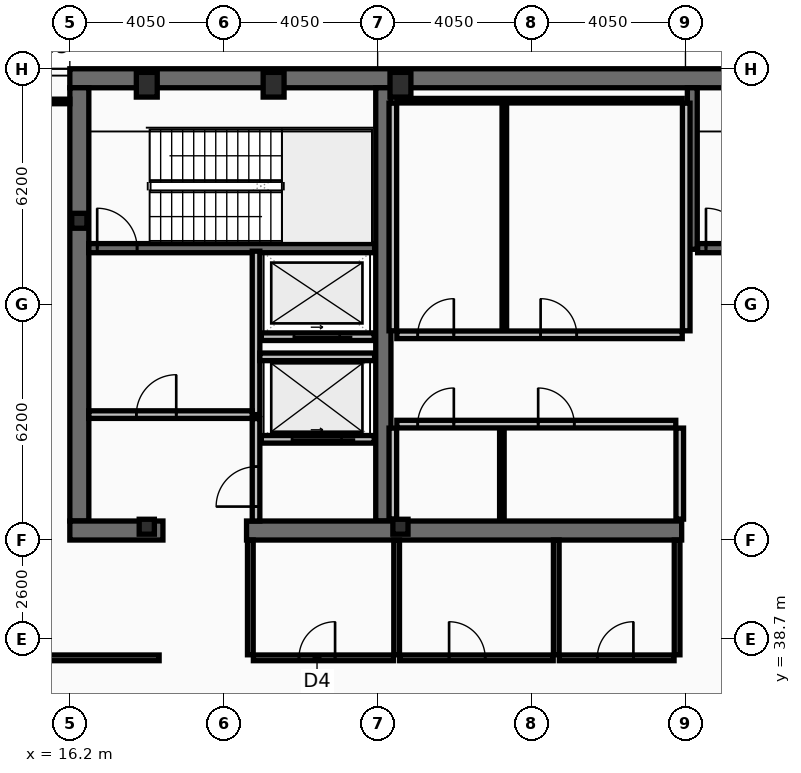
"""IFC4 building model, lengths in metres.
Left out: names, types, materials, properties, quantities, classifications, styles, units other than length and angle.
Written with IfcOpenShell. Run it as: python <this file> out.ifc"""

import sys

from ifc_helpers import new_model, si_unit, direction, frame, frame_2d, origin, origin_2d, place, context, subcontext, project, spatial, rectangle, hollow_rectangle, i_section, extrude, element, fill, save


model = new_model("IFC4")
c1 = context("Model", 3, precision=1e-05, world=origin(), true_north=direction((0.0, 1.0)))
c2 = subcontext(c1, "Body", "Model", "MODEL_VIEW")
j1 = project(units=[si_unit("LENGTHUNIT", "METRE"), si_unit("PLANEANGLEUNIT", "RADIAN")], contexts=[c1])
p1 = place(None, origin())
s1 = spatial("IfcSite", under=j1, at=p1, CompositionType="ELEMENT")
p2 = place(p1, origin())
s2 = spatial("IfcBuilding", under=s1, at=p2, CompositionType="ELEMENT")
p3 = place(p2, frame((0.0, 0.0, 310.2)))
s3 = spatial("IfcBuildingStorey", under=s2, at=p3, CompositionType="ELEMENT", Elevation=310.2)
p4 = place(p3, frame((16.2, 53.45, 0.0), z_axis=(0.0, 0.0, 1.0), x_axis=(1.0, 0.0, 0.0)))
e1 = element("IfcWall", 1, at=p4, inside=s3, PredefinedType="SHEAR", context=c2, shape_type="SweptSolid", body=[
    extrude(rectangle(XDim=40.5, YDim=0.5, at=frame_2d((20.25, 0.0))), origin(), (0.0, 0.0, 1.0), 4.24),
])
p5 = place(p3, frame((16.45, 41.8, 0.0), z_axis=(0.0, 0.0, 1.0), x_axis=(0.0, 1.0, 0.0)))
e2 = element("IfcWall", 2, at=p5, inside=s3, PredefinedType="SHEAR", context=c2, shape_type="SweptSolid", body=[
    extrude(rectangle(XDim=11.4, YDim=0.5, at=frame_2d((5.7, 0.0))), origin(), (0.0, 0.0, 1.0), 4.24),
])
p6 = place(p3, frame((24.45, 41.8, 0.0), z_axis=(0.0, 0.0, 1.0), x_axis=(0.0, 1.0, 0.0)))
e3 = element("IfcWall", 3, at=p6, inside=s3, PredefinedType="SHEAR", context=c2, shape_type="SweptSolid", body=[
    extrude(rectangle(XDim=11.4, YDim=0.4, at=frame_2d((5.7, 0.0))), origin(), (0.0, 0.0, 1.0), 4.24),
])
p7 = place(p3, frame((18.65, 41.55, 0.0), z_axis=(0.0, 0.0, 1.0), x_axis=(-1.0, 0.0, 0.0)))
e4 = element("IfcWall", 4, at=p7, inside=s3, PredefinedType="SHEAR", context=c2, shape_type="SweptSolid", body=[
    extrude(rectangle(XDim=2.45, YDim=0.5, at=frame_2d((1.225, 0.0))), origin(), (0.0, 0.0, 1.0), 4.24),
])
p8 = place(p3, frame((32.3, 41.55, 0.0), z_axis=(0.0, 0.0, 1.0), x_axis=(-1.0, 0.0, 0.0)))
e5 = element("IfcWall", 5, at=p8, inside=s3, PredefinedType="SHEAR", context=c2, shape_type="SweptSolid", body=[
    extrude(rectangle(XDim=11.45, YDim=0.5, at=frame_2d((5.725, 0.0))), origin(), (0.0, 0.0, 1.0), 4.24),
])
p9 = place(p3, frame((32.58, 48.95, 0.0), z_axis=(0.0, 0.0, 1.0), x_axis=(0.0, 1.0, 0.0)))
e6 = element("IfcWall", 6, at=p9, inside=s3, PredefinedType="SHEAR", context=c2, shape_type="SweptSolid", body=[
    extrude(rectangle(XDim=4.25, YDim=0.26, at=frame_2d((2.125, 0.0))), origin(), (0.0, 0.0, 1.0), 4.24),
])
p10 = place(p3, frame((16.7, 48.98, 0.0), z_axis=(0.0, 0.0, 1.0), x_axis=(1.0, 0.0, 0.0)))
e7 = element("IfcWall", 7, at=p10, inside=s3, PredefinedType="SHEAR", context=c2, shape_type="SweptSolid", body=[
    extrude(rectangle(XDim=7.52, YDim=0.24, at=frame_2d((3.76, 0.0))), origin(), (0.0, 0.0, 1.0), 4.24),
])
p11 = place(p10, frame((0.22, 0.0, 0.0)))
e8 = element("IfcOpeningElement", 8, at=p11, cuts=e7, PredefinedType="OPENING", context=c2, shape_type="SweptSolid", body=[
    extrude(rectangle(XDim=1.05, YDim=2.15, at=frame_2d((0.525, 1.075))), frame((0.0, 0.13, 0.0), z_axis=(0.0, -1.0, 0.0), x_axis=(1.0, 0.0, 0.0)), (0.0, 0.0, 1.0), 0.26),
])
p12 = place(p3, frame((32.72, 48.98, 0.0), z_axis=(0.0, 0.0, 1.0), x_axis=(1.0, 0.0, 0.0)))
e9 = element("IfcWall", 9, at=p12, inside=s3, PredefinedType="SHEAR", context=c2, shape_type="SweptSolid", body=[
    extrude(rectangle(XDim=7.56, YDim=0.24, at=frame_2d((3.78, 0.0))), origin(), (0.0, 0.0, 1.0), 4.24),
])
p13 = place(p12, frame((0.22, 0.0, 0.0)))
e10 = element("IfcOpeningElement", 10, at=p13, cuts=e9, PredefinedType="OPENING", context=c2, shape_type="SweptSolid", body=[
    extrude(rectangle(XDim=1.05, YDim=2.15, at=frame_2d((0.525, 1.075))), frame((0.0, 0.13, 0.0), z_axis=(0.0, -1.0, 0.0), x_axis=(1.0, 0.0, 0.0)), (0.0, 0.0, 1.0), 0.26),
])
for number, where, z_axis, x_axis in (
    (11, (18.225, 53.28, 0.0), (0.0, 0.0, 1.0), (1.0, 0.0, 0.0)),
    (12, (21.562, 53.28, 0.0), (0.0, 0.0, 1.0), (1.0, 0.0, 0.0)),
    (13, (24.9, 53.28, 0.0), (0.0, 0.0, 1.0), (1.0, 0.0, 0.0)),
):
    element("IfcColumn", number, at=place(p3, frame(where, z_axis=z_axis, x_axis=x_axis)), inside=s3, PredefinedType="COLUMN", context=c2, shape_type="SweptSolid", body=[
        extrude(hollow_rectangle(XDim=0.55, YDim=0.65, WallThickness=0.04, at=origin_2d()), origin(), (0.0, 0.0, 1.0), 4.4),
    ])
for number, where, z_axis, x_axis in (
    (14, (16.45, 49.7, 0.0), (0.0, 0.0, 1.0), (1.0, 0.0, 0.0)),
    (15, (18.225, 41.65, 0.0), (0.0, 0.0, 1.0), (1.0, 0.0, 0.0)),
    (16, (24.9, 41.65, 0.0), (0.0, 0.0, 1.0), (1.0, 0.0, 0.0)),
):
    element("IfcColumn", number, at=place(p3, frame(where, z_axis=z_axis, x_axis=x_axis)), inside=s3, PredefinedType="COLUMN", context=c2, shape_type="SweptSolid", body=[
        extrude(i_section(OverallWidth=0.399, OverallDepth=0.393, WebThickness=0.023, FlangeThickness=0.037, at=origin_2d()), origin(), (0.0, 0.0, 1.0), 4.4),
    ])
p14 = place(p3, frame((24.21, 43.95, 0.0), z_axis=(0.0, 0.0, 1.0), x_axis=(-1.0, 0.0, 0.0)))
e17 = element("IfcWall", 17, at=p14, inside=s3, PredefinedType="PARTITIONING", context=c2, shape_type="SweptSolid", body=[
    extrude(rectangle(XDim=2.97, YDim=0.2, at=frame_2d((1.485, 0.0))), origin(), (0.0, 0.0, 1.0), 4.24),
])
p15 = place(p14, frame((0.86, 0.0, 0.0)))
e18 = element("IfcOpeningElement", 18, at=p15, cuts=e17, PredefinedType="OPENING", context=c2, shape_type="SweptSolid", body=[
    extrude(rectangle(XDim=1.3, YDim=2.18, at=frame_2d((0.65, 1.09))), frame((0.0, 0.11, 0.0), z_axis=(0.0, -1.0, 0.0), x_axis=(1.0, 0.0, 0.0)), (0.0, 0.0, 1.0), 0.22),
])
p16 = place(p3, frame((24.21, 46.65, 0.0), z_axis=(0.0, 0.0, 1.0), x_axis=(-1.0, 0.0, 0.0)))
e19 = element("IfcWall", 19, at=p16, inside=s3, PredefinedType="PARTITIONING", context=c2, shape_type="SweptSolid", body=[
    extrude(rectangle(XDim=2.97, YDim=0.2, at=frame_2d((1.485, 0.0))), origin(), (0.0, 0.0, 1.0), 4.24),
])
p17 = place(p16, frame((0.91, 0.0, 0.0)))
e20 = element("IfcOpeningElement", 20, at=p17, cuts=e19, PredefinedType="OPENING", context=c2, shape_type="SweptSolid", body=[
    extrude(rectangle(XDim=1.2, YDim=2.18, at=frame_2d((0.6, 1.09))), frame((0.0, 0.11, 0.0), z_axis=(0.0, -1.0, 0.0), x_axis=(1.0, 0.0, 0.0)), (0.0, 0.0, 1.0), 0.22),
])
p18 = place(p3, frame((21.1, 44.6, 0.0), z_axis=(0.0, 0.0, 1.0), x_axis=(0.0, 1.0, 0.0)))
e21 = element("IfcWall", 21, at=p18, inside=s3, PredefinedType="PARTITIONING", context=c2, shape_type="SweptSolid", body=[
    extrude(rectangle(XDim=4.3, YDim=0.2, at=frame_2d((2.15, 0.0))), origin(), (0.0, 0.0, 1.0), 4.24),
])
p19 = place(p3, frame((16.7, 44.6, 0.0), z_axis=(0.0, 0.0, 1.0), x_axis=(1.0, 0.0, 0.0)))
e22 = element("IfcWall", 22, at=p19, inside=s3, PredefinedType="PARTITIONING", context=c2, shape_type="SweptSolid", body=[
    extrude(rectangle(XDim=4.3, YDim=0.2, at=frame_2d((2.15, 0.0))), origin(), (0.0, 0.0, 1.0), 4.24),
])
p20 = place(p19, frame((1.25, 0.0, 0.0)))
e23 = element("IfcOpeningElement", 23, at=p20, cuts=e22, PredefinedType="OPENING", context=c2, shape_type="SweptSolid", body=[
    extrude(rectangle(XDim=1.05, YDim=2.15, at=frame_2d((0.525, 1.075))), frame((0.0, 0.11, 0.0), z_axis=(0.0, -1.0, 0.0), x_axis=(1.0, 0.0, 0.0)), (0.0, 0.0, 1.0), 0.22),
])
p21 = place(p3, frame((21.2, 46.12, 0.0), z_axis=(0.0, 0.0, 1.0), x_axis=(1.0, 0.0, 0.0)))
e24 = element("IfcWall", 24, at=p21, inside=s3, PredefinedType="PARTITIONING", context=c2, shape_type="SweptSolid", body=[
    extrude(rectangle(XDim=3.02, YDim=0.2, at=frame_2d((1.51, 0.0))), origin(), (0.0, 0.0, 1.0), 4.24),
])
p22 = place(p3, frame((21.1, 41.8, 0.0), z_axis=(0.0, 0.0, 1.0), x_axis=(0.0, 1.0, 0.0)))
e25 = element("IfcWall", 25, at=p22, inside=s3, PredefinedType="PARTITIONING", context=c2, shape_type="SweptSolid", body=[
    extrude(rectangle(XDim=2.695, YDim=0.2, at=frame_2d((1.348, 0.0))), origin(), (0.0, 0.0, 1.0), 4.24),
])
p23 = place(p22, frame((0.38, 0.0, 0.0)))
e26 = element("IfcOpeningElement", 26, at=p23, cuts=e25, PredefinedType="OPENING", context=c2, shape_type="SweptSolid", body=[
    extrude(rectangle(XDim=1.05, YDim=2.15, at=frame_2d((0.525, 1.075))), frame((0.0, 0.11, 0.0), z_axis=(0.0, -1.0, 0.0), x_axis=(1.0, 0.0, 0.0)), (0.0, 0.0, 1.0), 0.22),
])
for number, where, z_axis, x_axis in (
    (27, (24.7, 46.805, 0.0), (0.0, 0.0, 1.0), (0.0, 1.0, 0.0)),
    (28, (32.42, 46.805, 0.0), (0.0, 0.0, 1.0), (0.0, 1.0, 0.0)),
):
    element("IfcWall", number, at=place(p3, frame(where, z_axis=z_axis, x_axis=x_axis)), inside=s3, PredefinedType="PARTITIONING", context=c2, shape_type="SweptSolid", body=[
        extrude(rectangle(XDim=5.99, YDim=0.2, at=frame_2d((2.995, 0.0))), origin(), (0.0, 0.0, 1.0), 4.24),
    ])
p24 = place(p3, frame((24.805, 52.86, 0.0), z_axis=(0.0, 0.0, 1.0), x_axis=(1.0, 0.0, 0.0)))
e29 = element("IfcWall", 29, at=p24, inside=s3, PredefinedType="PARTITIONING", context=c2, shape_type="SweptSolid", body=[
    extrude(rectangle(XDim=7.51, YDim=0.12, at=frame_2d((3.755, 0.0))), origin(), (0.0, 0.0, 1.0), 4.24),
])
p25 = place(p3, frame((27.634, 46.805, 0.0), z_axis=(0.0, 0.0, 1.0), x_axis=(0.0, 1.0, 0.0)))
e30 = element("IfcWall", 30, at=p25, inside=s3, PredefinedType="PARTITIONING", context=c2, shape_type="SweptSolid", body=[
    extrude(rectangle(XDim=5.99, YDim=0.12, at=frame_2d((2.995, 0.0))), origin(), (0.0, 0.0, 1.0), 4.24),
])
p26 = place(p3, frame((24.805, 46.7, 0.0), z_axis=(0.0, 0.0, 1.0), x_axis=(1.0, 0.0, 0.0)))
e31 = element("IfcWall", 31, at=p26, inside=s3, PredefinedType="PARTITIONING", context=c2, shape_type="SweptSolid", body=[
    extrude(rectangle(XDim=7.51, YDim=0.2, at=frame_2d((3.755, 0.0))), origin(), (0.0, 0.0, 1.0), 4.24),
])
p27 = place(p26, frame((0.55, 0.0, 0.0)))
e32 = element("IfcOpeningElement", 32, at=p27, cuts=e31, PredefinedType="OPENING", context=c2, shape_type="SweptSolid", body=[
    extrude(rectangle(XDim=0.95, YDim=2.1, at=frame_2d((0.475, 1.05))), frame((0.0, 0.11, 0.0), z_axis=(0.0, -1.0, 0.0), x_axis=(1.0, 0.0, 0.0)), (0.0, 0.0, 1.0), 0.22),
])
p28 = place(p26, frame((3.784, 0.0, 0.0)))
e33 = element("IfcOpeningElement", 33, at=p28, cuts=e31, PredefinedType="OPENING", context=c2, shape_type="SweptSolid", body=[
    extrude(rectangle(XDim=0.95, YDim=2.1, at=frame_2d((0.475, 1.05))), frame((0.0, 0.11, 0.0), z_axis=(0.0, -1.0, 0.0), x_axis=(1.0, 0.0, 0.0)), (0.0, 0.0, 1.0), 0.22),
])
for number, where, z_axis, x_axis in (
    (34, (24.7, 41.85, 0.0), (0.0, 0.0, 1.0), (0.0, 1.0, 0.0)),
    (35, (32.25, 41.85, 0.0), (0.0, 0.0, 1.0), (0.0, 1.0, 0.0)),
):
    element("IfcWall", number, at=place(p3, frame(where, z_axis=z_axis, x_axis=x_axis)), inside=s3, PredefinedType="PARTITIONING", context=c2, shape_type="SweptSolid", body=[
        extrude(rectangle(XDim=2.395, YDim=0.2, at=frame_2d((1.198, 0.0))), origin(), (0.0, 0.0, 1.0), 4.24),
    ])
p29 = place(p3, frame((27.569, 41.85, 0.0), z_axis=(0.0, 0.0, 1.0), x_axis=(0.0, 1.0, 0.0)))
e36 = element("IfcWall", 36, at=p29, inside=s3, PredefinedType="PARTITIONING", context=c2, shape_type="SweptSolid", body=[
    extrude(rectangle(XDim=2.395, YDim=0.12, at=frame_2d((1.198, 0.0))), origin(), (0.0, 0.0, 1.0), 4.24),
])
p30 = place(p3, frame((24.805, 44.35, 0.0), z_axis=(0.0, 0.0, 1.0), x_axis=(1.0, 0.0, 0.0)))
e37 = element("IfcWall", 37, at=p30, inside=s3, PredefinedType="PARTITIONING", context=c2, shape_type="SweptSolid", body=[
    extrude(rectangle(XDim=7.34, YDim=0.2, at=frame_2d((3.67, 0.0))), origin(), (0.0, 0.0, 1.0), 4.24),
])
p31 = place(p30, frame((0.55, 0.0, 0.0)))
e38 = element("IfcOpeningElement", 38, at=p31, cuts=e37, PredefinedType="OPENING", context=c2, shape_type="SweptSolid", body=[
    extrude(rectangle(XDim=0.95, YDim=2.1, at=frame_2d((0.475, 1.05))), frame((0.0, 0.11, 0.0), z_axis=(0.0, -1.0, 0.0), x_axis=(1.0, 0.0, 0.0)), (0.0, 0.0, 1.0), 0.22),
])
p32 = place(p30, frame((3.719, 0.0, 0.0)))
e39 = element("IfcOpeningElement", 39, at=p32, cuts=e37, PredefinedType="OPENING", context=c2, shape_type="SweptSolid", body=[
    extrude(rectangle(XDim=0.95, YDim=2.1, at=frame_2d((0.475, 1.05))), frame((0.0, 0.11, 0.0), z_axis=(0.0, -1.0, 0.0), x_axis=(1.0, 0.0, 0.0)), (0.0, 0.0, 1.0), 0.22),
])
p33 = place(p3, frame((21.03, 38.2, 0.0), z_axis=(0.0, 0.0, 1.0), x_axis=(1.0, 0.0, 0.0)))
e40 = element("IfcWall", 40, at=p33, inside=s3, PredefinedType="PARTITIONING", context=c2, shape_type="SweptSolid", body=[
    extrude(rectangle(XDim=3.69, YDim=0.15, at=frame_2d((1.845, 0.0))), origin(), (0.0, 0.0, 1.0), 3.63),
])
p34 = place(p33, frame((1.2, 0.0, 0.0)))
e41 = element("IfcOpeningElement", 41, at=p34, cuts=e40, PredefinedType="OPENING", context=c2, shape_type="SweptSolid", body=[
    extrude(rectangle(XDim=0.95, YDim=2.05, at=frame_2d((0.475, 1.025))), frame((0.0, 0.085, 0.0), z_axis=(0.0, -1.0, 0.0), x_axis=(1.0, 0.0, 0.0)), (0.0, 0.0, 1.0), 0.17),
])
p35 = place(p3, frame((24.88, 38.2, 0.0), z_axis=(0.0, 0.0, 1.0), x_axis=(1.0, 0.0, 0.0)))
e42 = element("IfcWall", 42, at=p35, inside=s3, PredefinedType="PARTITIONING", context=c2, shape_type="SweptSolid", body=[
    extrude(rectangle(XDim=4.04, YDim=0.15, at=frame_2d((2.02, 0.0))), origin(), (0.0, 0.0, 1.0), 3.63),
])
p36 = place(p35, frame((1.3, 0.0, 0.0)))
e43 = element("IfcOpeningElement", 43, at=p36, cuts=e42, PredefinedType="OPENING", context=c2, shape_type="SweptSolid", body=[
    extrude(rectangle(XDim=0.95, YDim=2.05, at=frame_2d((0.475, 1.025))), frame((0.0, 0.085, 0.0), z_axis=(0.0, -1.0, 0.0), x_axis=(1.0, 0.0, 0.0)), (0.0, 0.0, 1.0), 0.17),
])
p37 = place(p3, frame((29.08, 38.2, 0.0), z_axis=(0.0, 0.0, 1.0), x_axis=(1.0, 0.0, 0.0)))
e44 = element("IfcWall", 44, at=p37, inside=s3, PredefinedType="PARTITIONING", context=c2, shape_type="SweptSolid", body=[
    extrude(rectangle(XDim=3.02, YDim=0.15, at=frame_2d((1.51, 0.0))), origin(), (0.0, 0.0, 1.0), 4.24),
])
p38 = place(p37, frame((1.0, 0.0, 0.0)))
e45 = element("IfcOpeningElement", 45, at=p38, cuts=e44, PredefinedType="OPENING", context=c2, shape_type="SweptSolid", body=[
    extrude(rectangle(XDim=0.95, YDim=2.05, at=frame_2d((0.475, 1.025))), frame((0.0, 0.085, 0.0), z_axis=(0.0, -1.0, 0.0), x_axis=(1.0, 0.0, 0.0)), (0.0, 0.0, 1.0), 0.17),
])
p39 = place(p3, frame((20.95, 38.28, 0.0), z_axis=(0.0, 0.0, 1.0), x_axis=(0.0, 1.0, 0.0)))
e46 = element("IfcWall", 46, at=p39, inside=s3, PredefinedType="PARTITIONING", context=c2, shape_type="SweptSolid", body=[
    extrude(rectangle(XDim=3.02, YDim=0.15, at=frame_2d((1.51, 0.0))), origin(), (0.0, 0.0, 1.0), 4.24),
])
p40 = place(p3, frame((24.8, 38.28, 0.0), z_axis=(0.0, 0.0, 1.0), x_axis=(0.0, 1.0, 0.0)))
e47 = element("IfcWall", 47, at=p40, inside=s3, PredefinedType="PARTITIONING", context=c2, shape_type="SweptSolid", body=[
    extrude(rectangle(XDim=3.02, YDim=0.15, at=frame_2d((1.51, 0.0))), origin(), (0.0, 0.0, 1.0), 3.63),
])
for number, where, z_axis, x_axis in (
    (48, (29.0, 38.28, 0.0), (0.0, 0.0, 1.0), (0.0, 1.0, 0.0)),
    (49, (32.18, 38.28, 0.0), (0.0, 0.0, 1.0), (0.0, 1.0, 0.0)),
):
    element("IfcWall", number, at=place(p3, frame(where, z_axis=z_axis, x_axis=x_axis)), inside=s3, PredefinedType="PARTITIONING", context=c2, shape_type="SweptSolid", body=[
        extrude(rectangle(XDim=3.02, YDim=0.15, at=frame_2d((1.51, 0.0))), origin(), (0.0, 0.0, 1.0), 4.24),
    ])
p41 = place(p3, frame((12.095, 38.2, 0.0), z_axis=(0.0, 0.0, 1.0), x_axis=(1.0, 0.0, 0.0)))
e50 = element("IfcWall", 50, at=p41, inside=s3, PredefinedType="PARTITIONING", context=c2, shape_type="SweptSolid", body=[
    extrude(rectangle(XDim=6.455, YDim=0.15, at=frame_2d((3.228, 0.0))), origin(), (0.0, 0.0, 1.0), 3.63),
])
p42 = place(p41, frame((2.32, 0.0, 0.0)))
e51 = element("IfcOpeningElement", 51, at=p42, cuts=e50, PredefinedType="OPENING", context=c2, shape_type="SweptSolid", body=[
    extrude(rectangle(XDim=1.0, YDim=2.05, at=frame_2d((0.5, 1.025))), frame((0.0, 0.085, 0.0), z_axis=(0.0, -1.0, 0.0), x_axis=(1.0, 0.0, 0.0)), (0.0, 0.0, 1.0), 0.17),
])
p43 = place(p3, frame((12.095, 52.84, 0.0), z_axis=(0.0, 0.0, 1.0), x_axis=(1.0, 0.0, 0.0)))
e52 = element("IfcWall", 52, at=p43, inside=s3, PredefinedType="PARTITIONING", context=c2, shape_type="SweptSolid", body=[
    extrude(rectangle(XDim=4.105, YDim=0.12, at=frame_2d((2.052, 0.0))), origin(), (0.0, 0.0, 1.0), 4.24),
])
p44 = place(p11, origin())
e53 = element("IfcDoor", 53, at=p44, inside=s3, OperationType="SINGLE_SWING_LEFT", PredefinedType="DOOR", context=c2, shape_type="SweptSolid", body=[
    extrude(rectangle(XDim=1.05, YDim=2.15, at=frame_2d((0.525, 1.075))), frame((0.0, 0.025, 0.0), z_axis=(0.0, -1.0, 0.0), x_axis=(1.0, 0.0, 0.0)), (0.0, 0.0, 1.0), 0.05),
])
fill(e8, e53)
p45 = place(p13, origin())
e54 = element("IfcDoor", 54, at=p45, inside=s3, OperationType="SINGLE_SWING_LEFT", PredefinedType="DOOR", context=c2, shape_type="SweptSolid", body=[
    extrude(rectangle(XDim=1.05, YDim=2.15, at=frame_2d((0.525, 1.075))), frame((0.0, 0.025, 0.0), z_axis=(0.0, -1.0, 0.0), x_axis=(1.0, 0.0, 0.0)), (0.0, 0.0, 1.0), 0.05),
])
fill(e10, e54)
p46 = place(p15, origin())
e55 = element("IfcDoor", 55, at=p46, inside=s3, OperationType="SLIDING_TO_LEFT", PredefinedType="DOOR", context=c2, shape_type="SweptSolid", body=[
    extrude(rectangle(XDim=1.3, YDim=2.18, at=frame_2d((0.65, 1.09))), frame((0.0, 0.025, 0.0), z_axis=(0.0, -1.0, 0.0), x_axis=(1.0, 0.0, 0.0)), (0.0, 0.0, 1.0), 0.05),
])
fill(e18, e55)
p47 = place(p17, origin())
e56 = element("IfcDoor", 56, at=p47, inside=s3, OperationType="SLIDING_TO_LEFT", PredefinedType="DOOR", context=c2, shape_type="SweptSolid", body=[
    extrude(rectangle(XDim=1.2, YDim=2.18, at=frame_2d((0.6, 1.09))), frame((0.0, 0.025, 0.0), z_axis=(0.0, -1.0, 0.0), x_axis=(1.0, 0.0, 0.0)), (0.0, 0.0, 1.0), 0.05),
])
fill(e20, e56)
p48 = place(p20, origin())
e57 = element("IfcDoor", 57, at=p48, inside=s3, OperationType="SINGLE_SWING_RIGHT", PredefinedType="DOOR", context=c2, shape_type="SweptSolid", body=[
    extrude(rectangle(XDim=1.05, YDim=2.15, at=frame_2d((0.525, 1.075))), frame((0.0, 0.025, 0.0), z_axis=(0.0, -1.0, 0.0), x_axis=(1.0, 0.0, 0.0)), (0.0, 0.0, 1.0), 0.05),
])
fill(e23, e57)
p49 = place(p23, origin())
e58 = element("IfcDoor", 58, at=p49, inside=s3, OperationType="SINGLE_SWING_LEFT", PredefinedType="DOOR", context=c2, shape_type="SweptSolid", body=[
    extrude(rectangle(XDim=1.05, YDim=2.15, at=frame_2d((0.525, 1.075))), frame((0.0, 0.025, 0.0), z_axis=(0.0, -1.0, 0.0), x_axis=(1.0, 0.0, 0.0)), (0.0, 0.0, 1.0), 0.05),
])
fill(e26, e58)
p50 = place(p27, origin())
e59 = element("IfcDoor", 59, at=p50, inside=s3, OperationType="SINGLE_SWING_RIGHT", PredefinedType="DOOR", context=c2, shape_type="SweptSolid", body=[
    extrude(rectangle(XDim=0.95, YDim=2.1, at=frame_2d((0.475, 1.05))), frame((0.0, 0.025, 0.0), z_axis=(0.0, -1.0, 0.0), x_axis=(1.0, 0.0, 0.0)), (0.0, 0.0, 1.0), 0.05),
])
fill(e32, e59)
p51 = place(p28, origin())
e60 = element("IfcDoor", 60, at=p51, inside=s3, OperationType="SINGLE_SWING_LEFT", PredefinedType="DOOR", context=c2, shape_type="SweptSolid", body=[
    extrude(rectangle(XDim=0.95, YDim=2.1, at=frame_2d((0.475, 1.05))), frame((0.0, 0.025, 0.0), z_axis=(0.0, -1.0, 0.0), x_axis=(1.0, 0.0, 0.0)), (0.0, 0.0, 1.0), 0.05),
])
fill(e33, e60)
p52 = place(p31, origin())
e61 = element("IfcDoor", 61, at=p52, inside=s3, OperationType="SINGLE_SWING_RIGHT", PredefinedType="DOOR", context=c2, shape_type="SweptSolid", body=[
    extrude(rectangle(XDim=0.95, YDim=2.1, at=frame_2d((0.475, 1.05))), frame((0.0, 0.025, 0.0), z_axis=(0.0, -1.0, 0.0), x_axis=(1.0, 0.0, 0.0)), (0.0, 0.0, 1.0), 0.05),
])
fill(e38, e61)
p53 = place(p32, origin())
e62 = element("IfcDoor", 62, at=p53, inside=s3, OperationType="SINGLE_SWING_LEFT", PredefinedType="DOOR", context=c2, shape_type="SweptSolid", body=[
    extrude(rectangle(XDim=0.95, YDim=2.1, at=frame_2d((0.475, 1.05))), frame((0.0, 0.025, 0.0), z_axis=(0.0, -1.0, 0.0), x_axis=(1.0, 0.0, 0.0)), (0.0, 0.0, 1.0), 0.05),
])
fill(e39, e62)
p54 = place(p34, origin())
e63 = element("IfcDoor", 63, at=p54, inside=s3, OperationType="SINGLE_SWING_RIGHT", PredefinedType="DOOR", context=c2, shape_type="SweptSolid", body=[
    extrude(rectangle(XDim=0.95, YDim=2.05, at=frame_2d((0.475, 1.025))), frame((0.0, 0.025, 0.0), z_axis=(0.0, -1.0, 0.0), x_axis=(1.0, 0.0, 0.0)), (0.0, 0.0, 1.0), 0.05),
])
fill(e41, e63)
p55 = place(p36, origin())
e64 = element("IfcDoor", 64, at=p55, inside=s3, OperationType="SINGLE_SWING_LEFT", PredefinedType="DOOR", context=c2, shape_type="SweptSolid", body=[
    extrude(rectangle(XDim=0.95, YDim=2.05, at=frame_2d((0.475, 1.025))), frame((0.0, 0.025, 0.0), z_axis=(0.0, -1.0, 0.0), x_axis=(1.0, 0.0, 0.0)), (0.0, 0.0, 1.0), 0.05),
])
fill(e43, e64)
p56 = place(p38, origin())
e65 = element("IfcDoor", 65, at=p56, inside=s3, OperationType="SINGLE_SWING_RIGHT", PredefinedType="DOOR", context=c2, shape_type="SweptSolid", body=[
    extrude(rectangle(XDim=0.95, YDim=2.05, at=frame_2d((0.475, 1.025))), frame((0.0, 0.025, 0.0), z_axis=(0.0, -1.0, 0.0), x_axis=(1.0, 0.0, 0.0)), (0.0, 0.0, 1.0), 0.05),
])
fill(e45, e65)
save(model, sys.argv[1])
